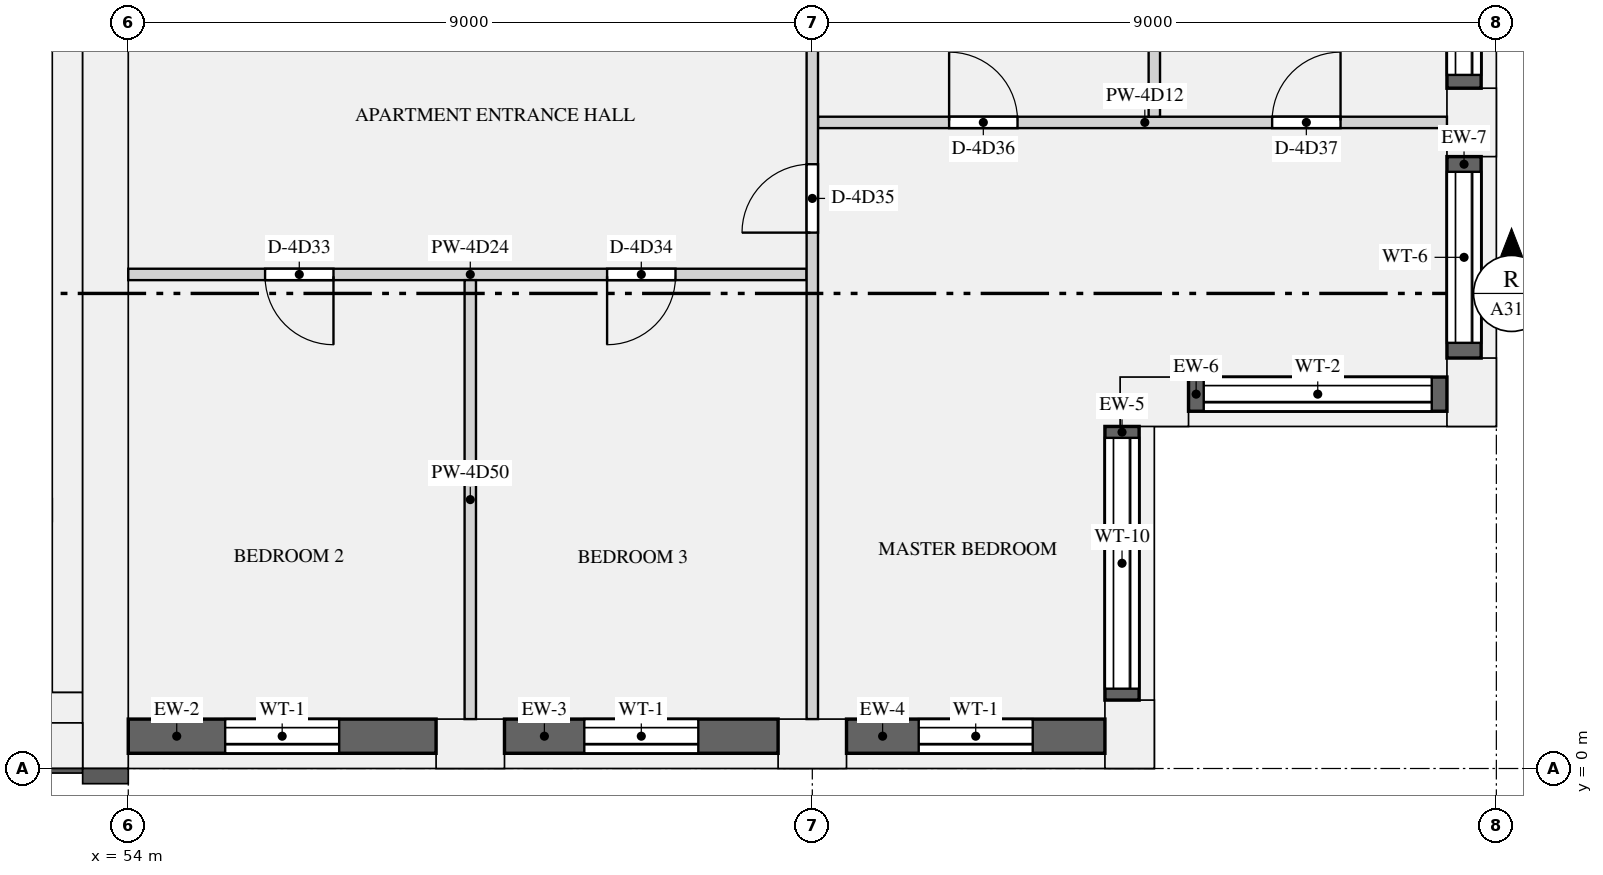
"""IFC4 building model, lengths in metres.
Left out: names, types, materials, properties, quantities, classifications, styles, units other than length and angle.
Written with IfcOpenShell. Run it as: python <this file> out.ifc"""

import sys

from ifc_helpers import new_model, si_unit, direction, frame, frame_2d, origin, origin_2d, place, context, subcontext, project, spatial, rectangle, extrude, element, fill, save


model = new_model("IFC4")
c1 = context("Model", 3, precision=1e-05, world=origin(), true_north=direction((0.0, 1.0)))
c2 = subcontext(c1, "Body", "Model", "MODEL_VIEW")
j1 = project(units=[si_unit("LENGTHUNIT", "METRE"), si_unit("PLANEANGLEUNIT", "RADIAN")], contexts=[c1])
p1 = place(None, origin())
s1 = spatial("IfcSite", under=j1, at=p1, CompositionType="ELEMENT")
p2 = place(p1, origin())
s2 = spatial("IfcBuilding", under=s1, at=p2, CompositionType="ELEMENT")
p3 = place(p2, frame((0.0, 0.0, 223.2)))
s3 = spatial("IfcBuildingStorey", under=s2, at=p3, CompositionType="ELEMENT", Elevation=223.2)
for number, where, z_axis, x_axis in (
    (1, (58.5, 0.325, 0.0), (0.0, 0.0, 1.0), (1.0, 0.0, 0.0)),
    (2, (63.0, 0.325, 0.0), (0.0, 0.0, 1.0), (1.0, 0.0, 0.0)),
    (3, (67.175, 0.45, 0.0), (0.0, 0.0, 1.0), (0.0, 1.0, 0.0)),
    (4, (67.5, 4.825, 0.0), (0.0, 0.0, 1.0), (1.0, 0.0, 0.0)),
    (5, (71.675, 4.95, 0.0), (0.0, 0.0, 1.0), (0.0, 1.0, 0.0)),
    (6, (71.675, 8.5, 0.0), (0.0, 0.0, 1.0), (0.0, 1.0, 0.0)),
):
    element("IfcColumn", number, at=place(p3, frame(where, z_axis=z_axis, x_axis=x_axis)), inside=s3, PredefinedType="USERDEFINED", context=c2, shape_type="SweptSolid", body=[
        extrude(rectangle(XDim=0.9, YDim=0.65, at=origin_2d()), origin(), (0.0, 0.0, 1.0), 3.15),
    ])
p4 = place(p3, frame((53.7, 0.0, 0.0), z_axis=(0.0, 0.0, 1.0), x_axis=(0.0, 1.0, 0.0)))
e7 = element("IfcWall", 7, at=p4, inside=s3, PredefinedType="SHEAR", context=c2, shape_type="SweptSolid", body=[
    extrude(rectangle(XDim=12.5, YDim=0.6, at=frame_2d((6.25, 0.0))), origin(), (0.0, 0.0, 1.0), 3.15),
])
p5 = place(p3, frame((18.6, 0.3, 0.0), z_axis=(0.0, 0.0, 1.0), x_axis=(1.0, 0.0, 0.0)))
e8 = element("IfcWall", 8, at=p5, inside=s3, PredefinedType="SHEAR", context=c2, shape_type="SweptSolid", body=[
    extrude(rectangle(XDim=34.8, YDim=0.6, at=frame_2d((17.4, 0.0))), origin(), (0.0, 0.0, 1.0), 3.15),
])
p6 = place(p3, frame((53.2, 1.0, 0.0), z_axis=(0.0, 0.0, 1.0), x_axis=(0.0, 1.0, 0.0)))
e9 = element("IfcWall", 9, at=p6, inside=s3, PredefinedType="SHEAR", context=c2, shape_type="SweptSolid", body=[
    extrude(rectangle(XDim=10.9, YDim=0.4, at=frame_2d((5.45, 0.0))), origin(), (0.0, 0.0, 1.0), 3.15),
])
p7 = place(p3, frame((18.6, 0.8, 0.0), z_axis=(0.0, 0.0, 1.0), x_axis=(1.0, 0.0, 0.0)))
e10 = element("IfcWall", 10, at=p7, inside=s3, PredefinedType="SHEAR", context=c2, shape_type="SweptSolid", body=[
    extrude(rectangle(XDim=34.8, YDim=0.4, at=frame_2d((17.4, 0.0))), origin(), (0.0, 0.0, 1.0), 3.15),
])
p8 = place(p3, frame((54.0, 0.425, 0.9), z_axis=(0.0, 0.0, 1.0), x_axis=(1.0, 0.0, 0.0)))
e11 = element("IfcWall", 11, at=p8, inside=s3, PredefinedType="SOLIDWALL", context=c2, shape_type="SweptSolid", body=[
    extrude(rectangle(XDim=4.05, YDim=0.45, at=frame_2d((2.025, 0.0))), origin(), (0.0, 0.0, 1.0), 1.93),
])
p9 = place(p8, frame((1.275, 0.0, 0.15)))
e12 = element("IfcOpeningElement", 12, at=p9, cuts=e11, PredefinedType="OPENING", context=c2, shape_type="SweptSolid", body=[
    extrude(rectangle(XDim=1.5, YDim=1.5, at=frame_2d((0.75, 0.75))), frame((0.0, 0.235, 0.0), z_axis=(0.0, -1.0, 0.0), x_axis=(1.0, 0.0, 0.0)), (0.0, 0.0, 1.0), 0.47),
])
p10 = place(p3, frame((58.95, 0.425, 0.9), z_axis=(0.0, 0.0, 1.0), x_axis=(1.0, 0.0, 0.0)))
e13 = element("IfcWall", 13, at=p10, inside=s3, PredefinedType="SOLIDWALL", context=c2, shape_type="SweptSolid", body=[
    extrude(rectangle(XDim=3.6, YDim=0.45, at=frame_2d((1.8, 0.0))), origin(), (0.0, 0.0, 1.0), 1.93),
])
p11 = place(p10, frame((1.05, 0.0, 0.15)))
e14 = element("IfcOpeningElement", 14, at=p11, cuts=e13, PredefinedType="OPENING", context=c2, shape_type="SweptSolid", body=[
    extrude(rectangle(XDim=1.5, YDim=1.5, at=frame_2d((0.75, 0.75))), frame((0.0, 0.235, 0.0), z_axis=(0.0, -1.0, 0.0), x_axis=(1.0, 0.0, 0.0)), (0.0, 0.0, 1.0), 0.47),
])
p12 = place(p3, frame((63.45, 0.425, 0.9), z_axis=(0.0, 0.0, 1.0), x_axis=(1.0, 0.0, 0.0)))
e15 = element("IfcWall", 15, at=p12, inside=s3, PredefinedType="SOLIDWALL", context=c2, shape_type="SweptSolid", body=[
    extrude(rectangle(XDim=3.4, YDim=0.45, at=frame_2d((1.7, 0.0))), origin(), (0.0, 0.0, 1.0), 1.93),
])
p13 = place(p12, frame((0.95, 0.0, 0.15)))
e16 = element("IfcOpeningElement", 16, at=p13, cuts=e15, PredefinedType="OPENING", context=c2, shape_type="SweptSolid", body=[
    extrude(rectangle(XDim=1.5, YDim=1.5, at=frame_2d((0.75, 0.75))), frame((0.0, 0.235, 0.0), z_axis=(0.0, -1.0, 0.0), x_axis=(1.0, 0.0, 0.0)), (0.0, 0.0, 1.0), 0.47),
])
p14 = place(p3, frame((67.075, 0.9, 0.9), z_axis=(0.0, 0.0, 1.0), x_axis=(0.0, 1.0, 0.0)))
e17 = element("IfcWall", 17, at=p14, inside=s3, PredefinedType="SOLIDWALL", context=c2, shape_type="SweptSolid", body=[
    extrude(rectangle(XDim=3.6, YDim=0.45, at=frame_2d((1.8, 0.0))), origin(), (0.0, 0.0, 1.0), 1.93),
])
p15 = place(p14, frame((0.15, 0.0, 0.15)))
e18 = element("IfcOpeningElement", 18, at=p15, cuts=e17, PredefinedType="OPENING", context=c2, shape_type="SweptSolid", body=[
    extrude(rectangle(XDim=3.3, YDim=1.5, at=frame_2d((1.65, 0.75))), frame((0.0, 0.235, 0.0), z_axis=(0.0, -1.0, 0.0), x_axis=(1.0, 0.0, 0.0)), (0.0, 0.0, 1.0), 0.47),
])
p16 = place(p3, frame((67.95, 4.925, 0.9), z_axis=(0.0, 0.0, 1.0), x_axis=(1.0, 0.0, 0.0)))
e19 = element("IfcWall", 19, at=p16, inside=s3, PredefinedType="SOLIDWALL", context=c2, shape_type="SweptSolid", body=[
    extrude(rectangle(XDim=3.4, YDim=0.45, at=frame_2d((1.7, 0.0))), origin(), (0.0, 0.0, 1.0), 1.93),
])
p17 = place(p16, frame((0.2, 0.0, 0.15)))
e20 = element("IfcOpeningElement", 20, at=p17, cuts=e19, PredefinedType="OPENING", context=c2, shape_type="SweptSolid", body=[
    extrude(rectangle(XDim=3.0, YDim=1.5, at=frame_2d((1.5, 0.75))), frame((0.0, 0.235, 0.0), z_axis=(0.0, -1.0, 0.0), x_axis=(1.0, 0.0, 0.0)), (0.0, 0.0, 1.0), 0.47),
])
p18 = place(p3, frame((71.575, 5.4, 0.9), z_axis=(0.0, 0.0, 1.0), x_axis=(0.0, 1.0, 0.0)))
e21 = element("IfcWall", 21, at=p18, inside=s3, PredefinedType="SOLIDWALL", context=c2, shape_type="SweptSolid", body=[
    extrude(rectangle(XDim=2.65, YDim=0.45, at=frame_2d((1.325, 0.0))), origin(), (0.0, 0.0, 1.0), 1.93),
])
p19 = place(p18, frame((0.2, 0.0, 0.15)))
e22 = element("IfcOpeningElement", 22, at=p19, cuts=e21, PredefinedType="OPENING", context=c2, shape_type="SweptSolid", body=[
    extrude(rectangle(XDim=2.25, YDim=1.5, at=frame_2d((1.125, 0.75))), frame((0.0, 0.235, 0.0), z_axis=(0.0, -1.0, 0.0), x_axis=(1.0, 0.0, 0.0)), (0.0, 0.0, 1.0), 0.47),
])
p20 = place(p3, frame((71.575, 8.95, 0.9), z_axis=(0.0, 0.0, 1.0), x_axis=(0.0, 1.0, 0.0)))
e23 = element("IfcWall", 23, at=p20, inside=s3, PredefinedType="SOLIDWALL", context=c2, shape_type="SweptSolid", body=[
    extrude(rectangle(XDim=3.1, YDim=0.45, at=frame_2d((1.55, 0.0))), origin(), (0.0, 0.0, 1.0), 1.93),
])
p21 = place(p20, frame((0.175, 0.0, 0.15)))
e24 = element("IfcOpeningElement", 24, at=p21, cuts=e23, PredefinedType="OPENING", context=c2, shape_type="SweptSolid", body=[
    extrude(rectangle(XDim=2.75, YDim=1.5, at=frame_2d((1.375, 0.75))), frame((0.0, 0.235, 0.0), z_axis=(0.0, -1.0, 0.0), x_axis=(1.0, 0.0, 0.0)), (0.0, 0.0, 1.0), 0.47),
])
p22 = place(p3, frame((63.075, 8.5, 0.0), z_axis=(0.0, 0.0, 1.0), x_axis=(1.0, 0.0, 0.0)))
e25 = element("IfcWall", 25, at=p22, inside=s3, PredefinedType="PARTITIONING", context=c2, shape_type="SweptSolid", body=[
    extrude(rectangle(XDim=8.275, YDim=0.15, at=frame_2d((4.138, 0.0))), origin(), (0.0, 0.0, 1.0), 2.83),
])
p23 = place(p22, frame((1.725, 0.0, 0.0)))
e26 = element("IfcOpeningElement", 26, at=p23, cuts=e25, PredefinedType="OPENING", context=c2, shape_type="SweptSolid", body=[
    extrude(rectangle(XDim=0.9, YDim=2.1, at=frame_2d((0.45, 1.05))), frame((0.0, 0.085, 0.0), z_axis=(0.0, -1.0, 0.0), x_axis=(1.0, 0.0, 0.0)), (0.0, 0.0, 1.0), 0.17),
])
p24 = place(p22, frame((5.975, 0.0, 0.0)))
e27 = element("IfcOpeningElement", 27, at=p24, cuts=e25, PredefinedType="OPENING", context=c2, shape_type="SweptSolid", body=[
    extrude(rectangle(XDim=0.9, YDim=2.1, at=frame_2d((0.45, 1.05))), frame((0.0, 0.085, 0.0), z_axis=(0.0, -1.0, 0.0), x_axis=(1.0, 0.0, 0.0)), (0.0, 0.0, 1.0), 0.17),
])
p25 = place(p3, frame((54.0, 6.5, 0.0), z_axis=(0.0, 0.0, 1.0), x_axis=(1.0, 0.0, 0.0)))
e28 = element("IfcWall", 28, at=p25, inside=s3, PredefinedType="PARTITIONING", context=c2, shape_type="SweptSolid", body=[
    extrude(rectangle(XDim=8.925, YDim=0.15, at=frame_2d((4.462, 0.0))), origin(), (0.0, 0.0, 1.0), 2.83),
])
p26 = place(p25, frame((1.8, 0.0, 0.0)))
e29 = element("IfcOpeningElement", 29, at=p26, cuts=e28, PredefinedType="OPENING", context=c2, shape_type="SweptSolid", body=[
    extrude(rectangle(XDim=0.9, YDim=2.1, at=frame_2d((0.45, 1.05))), frame((0.0, 0.085, 0.0), z_axis=(0.0, -1.0, 0.0), x_axis=(1.0, 0.0, 0.0)), (0.0, 0.0, 1.0), 0.17),
])
p27 = place(p25, frame((6.3, 0.0, 0.0)))
e30 = element("IfcOpeningElement", 30, at=p27, cuts=e28, PredefinedType="OPENING", context=c2, shape_type="SweptSolid", body=[
    extrude(rectangle(XDim=0.9, YDim=2.1, at=frame_2d((0.45, 1.05))), frame((0.0, 0.085, 0.0), z_axis=(0.0, -1.0, 0.0), x_axis=(1.0, 0.0, 0.0)), (0.0, 0.0, 1.0), 0.17),
])
p28 = place(p3, frame((63.0, 0.65, 0.0), z_axis=(0.0, 0.0, 1.0), x_axis=(0.0, 1.0, 0.0)))
e31 = element("IfcWall", 31, at=p28, inside=s3, PredefinedType="PARTITIONING", context=c2, shape_type="SweptSolid", body=[
    extrude(rectangle(XDim=23.75, YDim=0.15, at=frame_2d((11.875, 0.0))), origin(), (0.0, 0.0, 1.0), 2.83),
])
p29 = place(p28, frame((6.4, 0.0, 0.0)))
e32 = element("IfcOpeningElement", 32, at=p29, cuts=e31, PredefinedType="OPENING", context=c2, shape_type="SweptSolid", body=[
    extrude(rectangle(XDim=0.9, YDim=2.1, at=frame_2d((0.45, 1.05))), frame((0.0, 0.085, 0.0), z_axis=(0.0, -1.0, 0.0), x_axis=(1.0, 0.0, 0.0)), (0.0, 0.0, 1.0), 0.17),
])
p30 = place(p28, frame((17.625, 0.0, 0.0)))
e33 = element("IfcOpeningElement", 33, at=p30, cuts=e31, PredefinedType="OPENING", context=c2, shape_type="SweptSolid", body=[
    extrude(rectangle(XDim=1.5, YDim=2.1, at=frame_2d((0.75, 1.05))), frame((0.0, 0.085, 0.0), z_axis=(0.0, -1.0, 0.0), x_axis=(1.0, 0.0, 0.0)), (0.0, 0.0, 1.0), 0.17),
])
p31 = place(p3, frame((67.5, 8.575, 0.0), z_axis=(0.0, 0.0, 1.0), x_axis=(0.0, 1.0, 0.0)))
e34 = element("IfcWall", 34, at=p31, inside=s3, PredefinedType="PARTITIONING", context=c2, shape_type="SweptSolid", body=[
    extrude(rectangle(XDim=3.85, YDim=0.15, at=frame_2d((1.925, 0.0))), origin(), (0.0, 0.0, 1.0), 2.83),
])
p32 = place(p3, frame((58.5, 0.65, 0.0), z_axis=(0.0, 0.0, 1.0), x_axis=(0.0, 1.0, 0.0)))
e35 = element("IfcWall", 35, at=p32, inside=s3, PredefinedType="PARTITIONING", context=c2, shape_type="SweptSolid", body=[
    extrude(rectangle(XDim=5.775, YDim=0.15, at=frame_2d((2.888, 0.0))), origin(), (0.0, 0.0, 1.0), 2.83),
])
p33 = place(p9, origin())
e36 = element("IfcWindow", 36, at=p33, inside=s3, PartitioningType="SINGLE_PANEL", PredefinedType="WINDOW", context=c2, shape_type="SweptSolid", body=[
    extrude(rectangle(XDim=1.5, YDim=1.5, at=frame_2d((0.75, 0.75))), frame((0.0, -0.065, 0.0), z_axis=(0.0, -1.0, 0.0), x_axis=(1.0, 0.0, 0.0)), (0.0, 0.0, 1.0), 0.06),
])
fill(e12, e36)
p34 = place(p11, origin())
e37 = element("IfcWindow", 37, at=p34, inside=s3, PartitioningType="SINGLE_PANEL", PredefinedType="WINDOW", context=c2, shape_type="SweptSolid", body=[
    extrude(rectangle(XDim=1.5, YDim=1.5, at=frame_2d((0.75, 0.75))), frame((0.0, -0.065, 0.0), z_axis=(0.0, -1.0, 0.0), x_axis=(1.0, 0.0, 0.0)), (0.0, 0.0, 1.0), 0.06),
])
fill(e14, e37)
p35 = place(p13, origin())
e38 = element("IfcWindow", 38, at=p35, inside=s3, PartitioningType="SINGLE_PANEL", PredefinedType="WINDOW", context=c2, shape_type="SweptSolid", body=[
    extrude(rectangle(XDim=1.5, YDim=1.5, at=frame_2d((0.75, 0.75))), frame((0.0, -0.065, 0.0), z_axis=(0.0, -1.0, 0.0), x_axis=(1.0, 0.0, 0.0)), (0.0, 0.0, 1.0), 0.06),
])
fill(e16, e38)
p36 = place(p15, origin())
e39 = element("IfcWindow", 39, at=p36, inside=s3, PartitioningType="SINGLE_PANEL", PredefinedType="WINDOW", context=c2, shape_type="SweptSolid", body=[
    extrude(rectangle(XDim=3.3, YDim=1.5, at=frame_2d((1.65, 0.75))), frame((0.0, -0.065, 0.0), z_axis=(0.0, -1.0, 0.0), x_axis=(1.0, 0.0, 0.0)), (0.0, 0.0, 1.0), 0.06),
])
fill(e18, e39)
p37 = place(p17, origin())
e40 = element("IfcWindow", 40, at=p37, inside=s3, PartitioningType="SINGLE_PANEL", PredefinedType="WINDOW", context=c2, shape_type="SweptSolid", body=[
    extrude(rectangle(XDim=3.0, YDim=1.5, at=frame_2d((1.5, 0.75))), frame((0.0, -0.065, 0.0), z_axis=(0.0, -1.0, 0.0), x_axis=(1.0, 0.0, 0.0)), (0.0, 0.0, 1.0), 0.06),
])
fill(e20, e40)
p38 = place(p19, origin())
e41 = element("IfcWindow", 41, at=p38, inside=s3, PartitioningType="SINGLE_PANEL", PredefinedType="WINDOW", context=c2, shape_type="SweptSolid", body=[
    extrude(rectangle(XDim=2.25, YDim=1.5, at=frame_2d((1.125, 0.75))), frame((0.0, -0.065, 0.0), z_axis=(0.0, -1.0, 0.0), x_axis=(1.0, 0.0, 0.0)), (0.0, 0.0, 1.0), 0.06),
])
fill(e22, e41)
p39 = place(p21, origin())
e42 = element("IfcWindow", 42, at=p39, inside=s3, PartitioningType="SINGLE_PANEL", PredefinedType="WINDOW", context=c2, shape_type="SweptSolid", body=[
    extrude(rectangle(XDim=2.75, YDim=1.5, at=frame_2d((1.375, 0.75))), frame((0.0, -0.065, 0.0), z_axis=(0.0, -1.0, 0.0), x_axis=(1.0, 0.0, 0.0)), (0.0, 0.0, 1.0), 0.06),
])
fill(e24, e42)
p40 = place(p26, frame((0.9, 0.0, 0.0), z_axis=(0.0, 0.0, 1.0), x_axis=(-1.0, 0.0, 0.0)))
e43 = element("IfcDoor", 43, at=p40, inside=s3, OperationType="SINGLE_SWING_LEFT", PredefinedType="DOOR", context=c2, shape_type="SweptSolid", body=[
    extrude(rectangle(XDim=0.9, YDim=2.1, at=frame_2d((0.45, 1.05))), frame((0.0, 0.025, 0.0), z_axis=(0.0, -1.0, 0.0), x_axis=(1.0, 0.0, 0.0)), (0.0, 0.0, 1.0), 0.05),
])
fill(e29, e43)
p41 = place(p27, frame((0.9, 0.0, 0.0), z_axis=(0.0, 0.0, 1.0), x_axis=(-1.0, 0.0, 0.0)))
e44 = element("IfcDoor", 44, at=p41, inside=s3, OperationType="SINGLE_SWING_RIGHT", PredefinedType="DOOR", context=c2, shape_type="SweptSolid", body=[
    extrude(rectangle(XDim=0.9, YDim=2.1, at=frame_2d((0.45, 1.05))), frame((0.0, 0.025, 0.0), z_axis=(0.0, -1.0, 0.0), x_axis=(1.0, 0.0, 0.0)), (0.0, 0.0, 1.0), 0.05),
])
fill(e30, e44)
p42 = place(p29, origin())
e45 = element("IfcDoor", 45, at=p42, inside=s3, OperationType="SINGLE_SWING_LEFT", PredefinedType="DOOR", context=c2, shape_type="SweptSolid", body=[
    extrude(rectangle(XDim=0.9, YDim=2.1, at=frame_2d((0.45, 1.05))), frame((0.0, 0.025, 0.0), z_axis=(0.0, -1.0, 0.0), x_axis=(1.0, 0.0, 0.0)), (0.0, 0.0, 1.0), 0.05),
])
fill(e32, e45)
p43 = place(p23, origin())
e46 = element("IfcDoor", 46, at=p43, inside=s3, OperationType="SINGLE_SWING_LEFT", PredefinedType="DOOR", context=c2, shape_type="SweptSolid", body=[
    extrude(rectangle(XDim=0.9, YDim=2.1, at=frame_2d((0.45, 1.05))), frame((0.0, 0.025, 0.0), z_axis=(0.0, -1.0, 0.0), x_axis=(1.0, 0.0, 0.0)), (0.0, 0.0, 1.0), 0.05),
])
fill(e26, e46)
p44 = place(p24, origin())
e47 = element("IfcDoor", 47, at=p44, inside=s3, OperationType="SINGLE_SWING_RIGHT", PredefinedType="DOOR", context=c2, shape_type="SweptSolid", body=[
    extrude(rectangle(XDim=0.9, YDim=2.1, at=frame_2d((0.45, 1.05))), frame((0.0, 0.025, 0.0), z_axis=(0.0, -1.0, 0.0), x_axis=(1.0, 0.0, 0.0)), (0.0, 0.0, 1.0), 0.05),
])
fill(e27, e47)
save(model, sys.argv[1])
